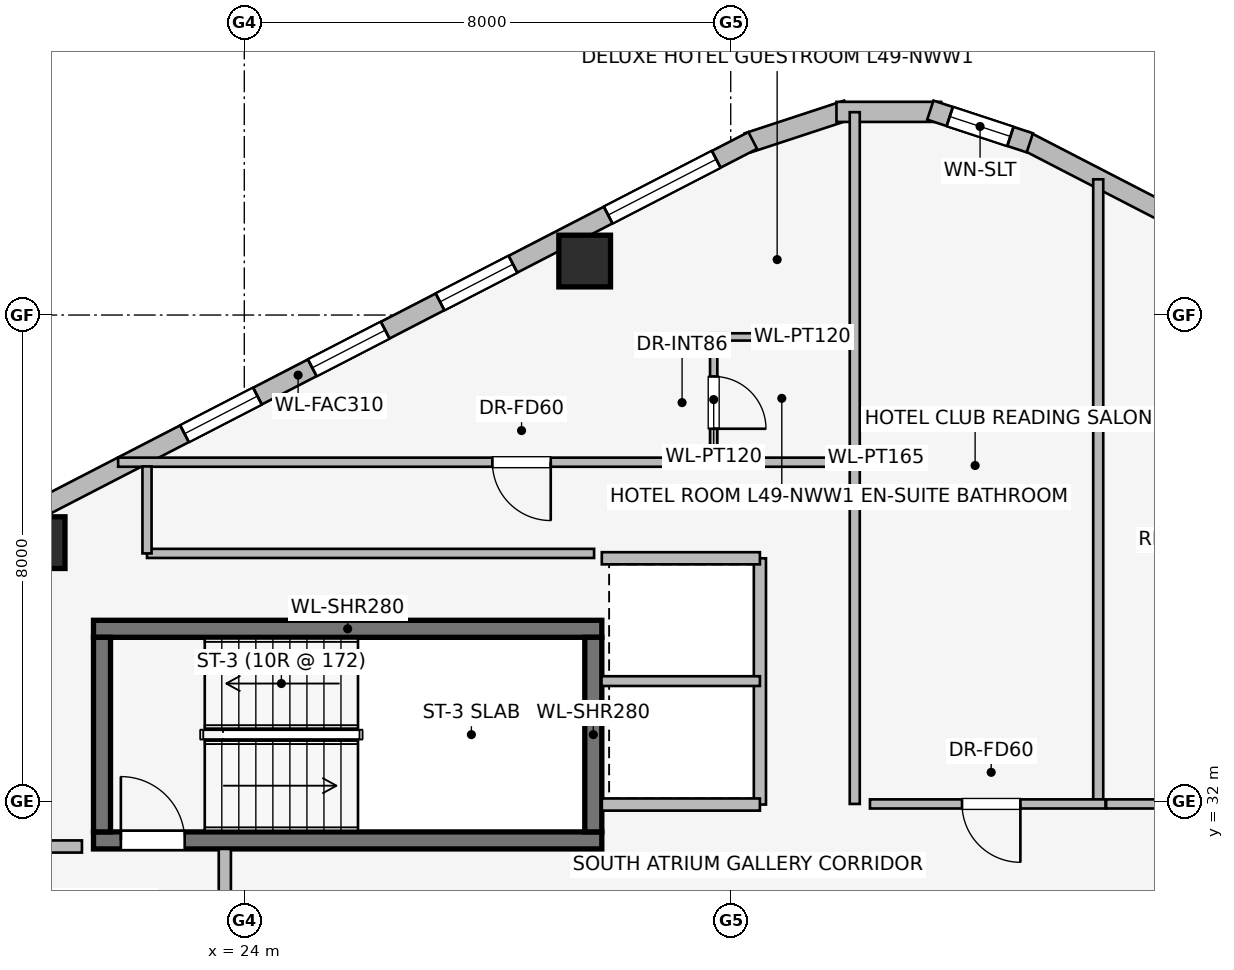
"""IFC4 building model, lengths in metres.
Left out: names, types, materials, properties, quantities, classifications, styles, units other than length and angle.
Written with IfcOpenShell. Run it as: python <this file> out.ifc"""

import sys

from ifc_helpers import new_model, si_unit, direction, frame, frame_2d, origin, origin_2d, place, context, subcontext, project, spatial, rectangle, extrude, element, fill, save


model = new_model("IFC4")
c1 = context("Model", 3, precision=1e-05, world=origin(), true_north=direction((0.0, 1.0)))
c2 = subcontext(c1, "Body", "Model", "MODEL_VIEW")
j1 = project(units=[si_unit("LENGTHUNIT", "METRE"), si_unit("PLANEANGLEUNIT", "RADIAN")], contexts=[c1])
p1 = place(None, origin())
s1 = spatial("IfcSite", under=j1, at=p1, CompositionType="ELEMENT")
p2 = place(p1, origin())
s2 = spatial("IfcBuilding", under=s1, at=p2, CompositionType="ELEMENT")
p3 = place(p2, frame((0.0, 0.0, 180.9)))
s3 = spatial("IfcBuildingStorey", under=s2, at=p3, CompositionType="ELEMENT", Elevation=180.9)
p4 = place(p3, frame((21.52, 31.36, 0.0), z_axis=(0.0, 0.0, 1.0), x_axis=(1.0, 0.0, 0.0)))
e1 = element("IfcWall", 1, at=p4, inside=s3, PredefinedType="SHEAR", context=c2, shape_type="SweptSolid", body=[
    extrude(rectangle(XDim=8.36, YDim=0.28, at=frame_2d((4.18, 0.0))), origin(), (0.0, 0.0, 1.0), 3.45),
])
p5 = place(p4, frame((0.45, 0.0, 0.0)))
e2 = element("IfcOpeningElement", 2, at=p5, cuts=e1, PredefinedType="OPENING", context=c2, shape_type="SweptSolid", body=[
    extrude(rectangle(XDim=1.05, YDim=2.0, at=frame_2d((0.525, 1.0))), frame((0.0, 0.15, 0.0), z_axis=(0.0, -1.0, 0.0), x_axis=(1.0, 0.0, 0.0)), (0.0, 0.0, 1.0), 0.3),
])
p6 = place(p3, frame((29.88, 34.84, 0.0), z_axis=(0.0, 0.0, 1.0), x_axis=(-1.0, 0.0, 0.0)))
e3 = element("IfcWall", 3, at=p6, inside=s3, PredefinedType="SHEAR", context=c2, shape_type="SweptSolid", body=[
    extrude(rectangle(XDim=8.36, YDim=0.28, at=frame_2d((4.18, 0.0))), origin(), (0.0, 0.0, 1.0), 3.45),
])
for number, where, z_axis, x_axis in (
    (4, (21.66, 34.7, 0.0), (0.0, 0.0, 1.0), (0.0, -1.0, 0.0)),
    (5, (29.74, 31.5, 0.0), (0.0, 0.0, 1.0), (0.0, 1.0, 0.0)),
):
    element("IfcWall", number, at=place(p3, frame(where, z_axis=z_axis, x_axis=x_axis)), inside=s3, PredefinedType="SHEAR", context=c2, shape_type="SweptSolid", body=[
        extrude(rectangle(XDim=3.2, YDim=0.28, at=frame_2d((1.6, 0.0))), origin(), (0.0, 0.0, 1.0), 3.45),
    ])
for number, where, z_axis, x_axis in (
    (6, (29.598, 40.888, 0.0), (0.0, 0.0, 1.0), (1.0, 0.0, 0.0)),
    (7, (20.626, 36.257, 0.0), (0.0, 0.0, 1.0), (1.0, 0.0, 0.0)),
):
    element("IfcColumn", number, at=place(p3, frame(where, z_axis=z_axis, x_axis=x_axis)), inside=s3, PredefinedType="COLUMN", context=c2, shape_type="SweptSolid", body=[
        extrude(rectangle(XDim=0.85, YDim=0.85, at=origin_2d()), origin(), (0.0, 0.0, 1.0), 3.45),
    ])
p7 = place(p3, frame((36.838, 42.871, 0.0), z_axis=(0.0, 0.0, 1.0), x_axis=(0.888626188278, -0.458632202867, 0.0)))
e8 = element("IfcWall", 8, at=p7, inside=s3, PredefinedType="STANDARD", context=c2, shape_type="SweptSolid", body=[
    extrude(rectangle(XDim=16.828, YDim=0.31, at=frame_2d((8.414, 0.0))), origin(), (0.0, 0.0, 1.0), 3.19),
])
p8 = place(p7, frame((4.172, 0.0, 0.75)))
e9 = element("IfcOpeningElement", 9, at=p8, cuts=e8, PredefinedType="OPENING", context=c2, shape_type="SweptSolid", body=[
    extrude(rectangle(XDim=1.05, YDim=1.4, at=frame_2d((0.525, 0.7))), frame((0.0, 0.165, 0.0), z_axis=(0.0, -1.0, 0.0), x_axis=(1.0, 0.0, 0.0)), (0.0, 0.0, 1.0), 0.33),
])
p9 = place(p7, frame((6.508, 0.0, 0.75)))
e10 = element("IfcOpeningElement", 10, at=p9, cuts=e8, PredefinedType="OPENING", context=c2, shape_type="SweptSolid", body=[
    extrude(rectangle(XDim=1.35, YDim=1.45, at=frame_2d((0.675, 0.725))), frame((0.0, 0.165, 0.0), z_axis=(0.0, -1.0, 0.0), x_axis=(1.0, 0.0, 0.0)), (0.0, 0.0, 1.0), 0.33),
])
p10 = place(p7, frame((8.497, 0.0, 0.75)))
e11 = element("IfcOpeningElement", 11, at=p10, cuts=e8, PredefinedType="OPENING", context=c2, shape_type="SweptSolid", body=[
    extrude(rectangle(XDim=1.35, YDim=1.45, at=frame_2d((0.675, 0.725))), frame((0.0, 0.165, 0.0), z_axis=(0.0, -1.0, 0.0), x_axis=(1.0, 0.0, 0.0)), (0.0, 0.0, 1.0), 0.33),
])
p11 = place(p7, frame((10.486, 0.0, 0.75)))
e12 = element("IfcOpeningElement", 12, at=p11, cuts=e8, PredefinedType="OPENING", context=c2, shape_type="SweptSolid", body=[
    extrude(rectangle(XDim=1.35, YDim=1.45, at=frame_2d((0.675, 0.725))), frame((0.0, 0.165, 0.0), z_axis=(0.0, -1.0, 0.0), x_axis=(1.0, 0.0, 0.0)), (0.0, 0.0, 1.0), 0.33),
])
p12 = place(p7, frame((14.153, 0.0, 0.75)))
e13 = element("IfcOpeningElement", 13, at=p12, cuts=e8, PredefinedType="OPENING", context=c2, shape_type="SweptSolid", body=[
    extrude(rectangle(XDim=2.0, YDim=1.5, at=frame_2d((1.0, 0.75))), frame((0.0, 0.165, 0.0), z_axis=(0.0, -1.0, 0.0), x_axis=(1.0, 0.0, 0.0)), (0.0, 0.0, 1.0), 0.33),
])
p13 = place(p3, frame((32.281, 42.832, 0.0), z_axis=(0.0, 0.0, 1.0), x_axis=(0.949937416267, 0.312440242569, 0.0)))
e14 = element("IfcWall", 14, at=p13, inside=s3, PredefinedType="STANDARD", context=c2, shape_type="SweptSolid", body=[
    extrude(rectangle(XDim=1.722, YDim=0.33, at=frame_2d((0.861, 0.0))), origin(), (0.0, 0.0, 1.0), 3.19),
])
p14 = place(p3, frame((33.739, 43.341, 0.0), z_axis=(0.0, 0.0, 1.0), x_axis=(1.0, 0.0, 0.0)))
e15 = element("IfcWall", 15, at=p14, inside=s3, PredefinedType="STANDARD", context=c2, shape_type="SweptSolid", body=[
    extrude(rectangle(XDim=1.722, YDim=0.33, at=frame_2d((0.861, 0.0))), origin(), (0.0, 0.0, 1.0), 3.19),
])
p15 = place(p3, frame((35.283, 43.37, 0.0), z_axis=(0.0, 0.0, 1.0), x_axis=(0.949937416267, -0.312440242569, 0.0)))
e16 = element("IfcWall", 16, at=p15, inside=s3, PredefinedType="STANDARD", context=c2, shape_type="SweptSolid", body=[
    extrude(rectangle(XDim=1.722, YDim=0.33, at=frame_2d((0.861, 0.0))), origin(), (0.0, 0.0, 1.0), 3.19),
])
p16 = place(p15, frame((0.336, 0.0, 0.75)))
e17 = element("IfcOpeningElement", 17, at=p16, cuts=e16, PredefinedType="OPENING", context=c2, shape_type="SweptSolid", body=[
    extrude(rectangle(XDim=1.05, YDim=1.4, at=frame_2d((0.525, 0.7))), frame((0.0, 0.175, 0.0), z_axis=(0.0, -1.0, 0.0), x_axis=(1.0, 0.0, 0.0)), (0.0, 0.0, 1.0), 0.35),
])
p17 = place(p3, frame((17.408, 35.153, 0.0), z_axis=(0.0, 0.0, 1.0), x_axis=(0.888626188278, 0.458632202867, 0.0)))
e18 = element("IfcWall", 18, at=p17, inside=s3, PredefinedType="STANDARD", context=c2, shape_type="SweptSolid", body=[
    extrude(rectangle(XDim=16.828, YDim=0.31, at=frame_2d((8.414, 0.0))), origin(), (0.0, 0.0, 1.0), 3.19),
])
p18 = place(p17, frame((0.675, 0.0, 0.75)))
e19 = element("IfcOpeningElement", 19, at=p18, cuts=e18, PredefinedType="OPENING", context=c2, shape_type="SweptSolid", body=[
    extrude(rectangle(XDim=2.0, YDim=1.5, at=frame_2d((1.0, 0.75))), frame((0.0, 0.165, 0.0), z_axis=(0.0, -1.0, 0.0), x_axis=(1.0, 0.0, 0.0)), (0.0, 0.0, 1.0), 0.33),
])
p19 = place(p17, frame((6.312, 0.0, 0.75)))
e20 = element("IfcOpeningElement", 20, at=p19, cuts=e18, PredefinedType="OPENING", context=c2, shape_type="SweptSolid", body=[
    extrude(rectangle(XDim=1.35, YDim=1.45, at=frame_2d((0.675, 0.725))), frame((0.0, 0.165, 0.0), z_axis=(0.0, -1.0, 0.0), x_axis=(1.0, 0.0, 0.0)), (0.0, 0.0, 1.0), 0.33),
])
p20 = place(p17, frame((8.676, 0.0, 0.75)))
e21 = element("IfcOpeningElement", 21, at=p20, cuts=e18, PredefinedType="OPENING", context=c2, shape_type="SweptSolid", body=[
    extrude(rectangle(XDim=1.35, YDim=1.45, at=frame_2d((0.675, 0.725))), frame((0.0, 0.165, 0.0), z_axis=(0.0, -1.0, 0.0), x_axis=(1.0, 0.0, 0.0)), (0.0, 0.0, 1.0), 0.33),
])
p21 = place(p17, frame((11.041, 0.0, 0.75)))
e22 = element("IfcOpeningElement", 22, at=p21, cuts=e18, PredefinedType="OPENING", context=c2, shape_type="SweptSolid", body=[
    extrude(rectangle(XDim=1.35, YDim=1.45, at=frame_2d((0.675, 0.725))), frame((0.0, 0.165, 0.0), z_axis=(0.0, -1.0, 0.0), x_axis=(1.0, 0.0, 0.0)), (0.0, 0.0, 1.0), 0.33),
])
p22 = place(p17, frame((14.153, 0.0, 0.75)))
e23 = element("IfcOpeningElement", 23, at=p22, cuts=e18, PredefinedType="OPENING", context=c2, shape_type="SweptSolid", body=[
    extrude(rectangle(XDim=2.0, YDim=1.5, at=frame_2d((1.0, 0.75))), frame((0.0, 0.165, 0.0), z_axis=(0.0, -1.0, 0.0), x_axis=(1.0, 0.0, 0.0)), (0.0, 0.0, 1.0), 0.33),
])
p23 = place(p3, frame((23.68, 25.68, 0.0), z_axis=(0.0, 0.0, 1.0), x_axis=(0.0, 1.0, 0.0)))
e24 = element("IfcWall", 24, at=p23, inside=s3, PredefinedType="PARTITIONING", context=c2, shape_type="SweptSolid", body=[
    extrude(rectangle(XDim=5.54, YDim=0.2, at=frame_2d((2.77, 0.0))), origin(), (0.0, 0.0, 1.0), 3.19),
])
p24 = place(p23, frame((1.8, 0.0, 0.0)))
e25 = element("IfcOpeningElement", 25, at=p24, cuts=e24, PredefinedType="OPENING", context=c2, shape_type="SweptSolid", body=[
    extrude(rectangle(XDim=1.05, YDim=2.0, at=frame_2d((0.525, 1.0))), frame((0.0, 0.11, 0.0), z_axis=(0.0, -1.0, 0.0), x_axis=(1.0, 0.0, 0.0)), (0.0, 0.0, 1.0), 0.22),
])
p25 = place(p3, frame((21.33, 31.26, 0.0), z_axis=(0.0, 0.0, 1.0), x_axis=(-1.0, 0.0, 0.0)))
e26 = element("IfcWall", 26, at=p25, inside=s3, PredefinedType="PARTITIONING", context=c2, shape_type="SweptSolid", body=[
    extrude(rectangle(XDim=1.68, YDim=0.2, at=frame_2d((0.84, 0.0))), origin(), (0.0, 0.0, 1.0), 3.19),
])
p26 = place(p3, frame((32.48, 31.95, 0.0), z_axis=(0.0, 0.0, 1.0), x_axis=(0.0, 1.0, 0.0)))
e27 = element("IfcWall", 27, at=p26, inside=s3, PredefinedType="PARTITIONING", context=c2, shape_type="SweptSolid", body=[
    extrude(rectangle(XDim=4.05, YDim=0.2, at=frame_2d((2.025, 0.0))), origin(), (0.0, 0.0, 1.0), 3.19),
])
for number, where, z_axis, x_axis in (
    (28, (29.88, 36.0, 0.0), (0.0, 0.0, 1.0), (1.0, 0.0, 0.0)),
    (29, (32.48, 31.95, 0.0), (0.0, 0.0, 1.0), (-1.0, 0.0, 0.0)),
):
    element("IfcWall", number, at=place(p3, frame(where, z_axis=z_axis, x_axis=x_axis)), inside=s3, PredefinedType="PARTITIONING", context=c2, shape_type="SweptSolid", body=[
        extrude(rectangle(XDim=2.6, YDim=0.2, at=frame_2d((1.3, 0.0))), origin(), (0.0, 0.0, 1.0), 3.19),
    ])
p27 = place(p3, frame((29.875, 33.98, 0.0), z_axis=(0.0, 0.0, 1.0), x_axis=(1.0, 0.0, 0.0)))
e30 = element("IfcWall", 30, at=p27, inside=s3, PredefinedType="PARTITIONING", context=c2, shape_type="SweptSolid", body=[
    extrude(rectangle(XDim=2.605, YDim=0.16, at=frame_2d((1.302, 0.0))), origin(), (0.0, 0.0, 1.0), 3.19),
])
p28 = place(p3, frame((34.0, 39.64, 0.0), z_axis=(0.0, 0.0, 1.0), x_axis=(-1.0, 0.0, 0.0)))
e31 = element("IfcWall", 31, at=p28, inside=s3, PredefinedType="PARTITIONING", context=c2, shape_type="SweptSolid", body=[
    extrude(rectangle(XDim=2.34, YDim=0.12, at=frame_2d((1.17, 0.0))), origin(), (0.0, 0.0, 1.0), 3.19),
])
p29 = place(p3, frame((31.72, 39.64, 0.0), z_axis=(0.0, 0.0, 1.0), x_axis=(0.0, -1.0, 0.0)))
e32 = element("IfcWall", 32, at=p29, inside=s3, PredefinedType="PARTITIONING", context=c2, shape_type="SweptSolid", body=[
    extrude(rectangle(XDim=2.06, YDim=0.12, at=frame_2d((1.03, 0.0))), origin(), (0.0, 0.0, 1.0), 3.19),
])
p30 = place(p29, frame((0.65, 0.0, 0.0)))
e33 = element("IfcOpeningElement", 33, at=p30, cuts=e32, PredefinedType="OPENING", context=c2, shape_type="SweptSolid", body=[
    extrude(rectangle(XDim=0.86, YDim=2.0, at=frame_2d((0.43, 1.0))), frame((0.0, 0.07, 0.0), z_axis=(0.0, -1.0, 0.0), x_axis=(1.0, 0.0, 0.0)), (0.0, 0.0, 1.0), 0.14),
])
p31 = place(p3, frame((34.0, 37.58, 0.0), z_axis=(0.0, 0.0, 1.0), x_axis=(-1.0, 0.0, 0.0)))
e34 = element("IfcWall", 34, at=p31, inside=s3, PredefinedType="PARTITIONING", context=c2, shape_type="SweptSolid", body=[
    extrude(rectangle(XDim=12.075, YDim=0.15, at=frame_2d((6.038, 0.0))), origin(), (0.0, 0.0, 1.0), 3.19),
])
p32 = place(p31, frame((4.96, 0.0, 0.0)))
e35 = element("IfcOpeningElement", 35, at=p32, cuts=e34, PredefinedType="OPENING", context=c2, shape_type="SweptSolid", body=[
    extrude(rectangle(XDim=0.96, YDim=2.0, at=frame_2d((0.48, 1.0))), frame((0.0, 0.085, 0.0), z_axis=(0.0, -1.0, 0.0), x_axis=(1.0, 0.0, 0.0)), (0.0, 0.0, 1.0), 0.17),
])
p33 = place(p3, frame((34.04, 31.96, 0.0), z_axis=(0.0, 0.0, 1.0), x_axis=(0.0, 1.0, 0.0)))
e36 = element("IfcWall", 36, at=p33, inside=s3, PredefinedType="PARTITIONING", context=c2, shape_type="SweptSolid", body=[
    extrude(rectangle(XDim=11.376, YDim=0.165, at=frame_2d((5.688, 0.0))), origin(), (0.0, 0.0, 1.0), 3.19),
])
p34 = place(p3, frame((38.044, 31.97, 0.0), z_axis=(0.0, 0.0, 1.0), x_axis=(0.0, 1.0, 0.0)))
e37 = element("IfcWall", 37, at=p34, inside=s3, PredefinedType="PARTITIONING", context=c2, shape_type="SweptSolid", body=[
    extrude(rectangle(XDim=10.262, YDim=0.165, at=frame_2d((5.131, 0.0))), origin(), (0.0, 0.0, 1.0), 3.19),
])
p35 = place(p3, frame((38.164, 31.96, 0.0), z_axis=(0.0, 0.0, 1.0), x_axis=(-1.0, 0.0, 0.0)))
e38 = element("IfcWall", 38, at=p35, inside=s3, PredefinedType="PARTITIONING", context=c2, shape_type="SweptSolid", body=[
    extrude(rectangle(XDim=3.874, YDim=0.15, at=frame_2d((1.937, 0.0))), origin(), (0.0, 0.0, 1.0), 3.19),
])
p36 = place(p35, frame((1.4, 0.0, 0.0)))
e39 = element("IfcOpeningElement", 39, at=p36, cuts=e38, PredefinedType="OPENING", context=c2, shape_type="SweptSolid", body=[
    extrude(rectangle(XDim=0.96, YDim=2.0, at=frame_2d((0.48, 1.0))), frame((0.0, 0.085, 0.0), z_axis=(0.0, -1.0, 0.0), x_axis=(1.0, 0.0, 0.0)), (0.0, 0.0, 1.0), 0.17),
])
p37 = place(p3, frame((41.992, 31.96, 0.0), z_axis=(0.0, 0.0, 1.0), x_axis=(-1.0, 0.0, 0.0)))
e40 = element("IfcWall", 40, at=p37, inside=s3, PredefinedType="PARTITIONING", context=c2, shape_type="SweptSolid", body=[
    extrude(rectangle(XDim=3.818, YDim=0.15, at=frame_2d((1.909, 0.0))), origin(), (0.0, 0.0, 1.0), 3.19),
])
p38 = place(p37, frame((1.486, 0.0, 0.0)))
e41 = element("IfcOpeningElement", 41, at=p38, cuts=e40, PredefinedType="OPENING", context=c2, shape_type="SweptSolid", body=[
    extrude(rectangle(XDim=0.96, YDim=2.0, at=frame_2d((0.48, 1.0))), frame((0.0, 0.085, 0.0), z_axis=(0.0, -1.0, 0.0), x_axis=(1.0, 0.0, 0.0)), (0.0, 0.0, 1.0), 0.17),
])
p39 = place(p3, frame((29.753, 36.08, 0.0), z_axis=(0.0, 0.0, 1.0), x_axis=(-1.0, 0.0, 0.0)))
e42 = element("IfcWall", 42, at=p39, inside=s3, PredefinedType="PARTITIONING", context=c2, shape_type="SweptSolid", body=[
    extrude(rectangle(XDim=7.353, YDim=0.15, at=frame_2d((3.677, 0.0))), origin(), (0.0, 0.0, 1.0), 3.19),
])
p40 = place(p3, frame((22.4, 36.08, 0.0), z_axis=(0.0, 0.0, 1.0), x_axis=(0.0, 1.0, 0.0)))
e43 = element("IfcWall", 43, at=p40, inside=s3, PredefinedType="PARTITIONING", context=c2, shape_type="SweptSolid", body=[
    extrude(rectangle(XDim=1.43, YDim=0.15, at=frame_2d((0.715, 0.0))), origin(), (0.0, 0.0, 1.0), 3.19),
])
p41 = place(p16, origin())
e44 = element("IfcWindow", 44, at=p41, inside=s3, PartitioningType="SINGLE_PANEL", PredefinedType="WINDOW", context=c2, shape_type="SweptSolid", body=[
    extrude(rectangle(XDim=1.05, YDim=1.4, at=frame_2d((0.525, 0.7))), frame((0.0, 0.03, 0.0), z_axis=(0.0, -1.0, 0.0), x_axis=(1.0, 0.0, 0.0)), (0.0, 0.0, 1.0), 0.06),
])
fill(e17, e44)
p42 = place(p19, origin())
e45 = element("IfcWindow", 45, at=p42, inside=s3, PartitioningType="SINGLE_PANEL", PredefinedType="WINDOW", context=c2, shape_type="SweptSolid", body=[
    extrude(rectangle(XDim=1.35, YDim=1.45, at=frame_2d((0.675, 0.725))), frame((0.0, 0.03, 0.0), z_axis=(0.0, -1.0, 0.0), x_axis=(1.0, 0.0, 0.0)), (0.0, 0.0, 1.0), 0.06),
])
fill(e20, e45)
p43 = place(p20, origin())
e46 = element("IfcWindow", 46, at=p43, inside=s3, PartitioningType="SINGLE_PANEL", PredefinedType="WINDOW", context=c2, shape_type="SweptSolid", body=[
    extrude(rectangle(XDim=1.35, YDim=1.45, at=frame_2d((0.675, 0.725))), frame((0.0, 0.03, 0.0), z_axis=(0.0, -1.0, 0.0), x_axis=(1.0, 0.0, 0.0)), (0.0, 0.0, 1.0), 0.06),
])
fill(e21, e46)
p44 = place(p21, origin())
e47 = element("IfcWindow", 47, at=p44, inside=s3, PartitioningType="SINGLE_PANEL", PredefinedType="WINDOW", context=c2, shape_type="SweptSolid", body=[
    extrude(rectangle(XDim=1.35, YDim=1.45, at=frame_2d((0.675, 0.725))), frame((0.0, 0.03, 0.0), z_axis=(0.0, -1.0, 0.0), x_axis=(1.0, 0.0, 0.0)), (0.0, 0.0, 1.0), 0.06),
])
fill(e22, e47)
p45 = place(p22, origin())
e48 = element("IfcWindow", 48, at=p45, inside=s3, PartitioningType="SINGLE_PANEL", PredefinedType="WINDOW", context=c2, shape_type="SweptSolid", body=[
    extrude(rectangle(XDim=2.0, YDim=1.5, at=frame_2d((1.0, 0.75))), frame((0.0, 0.03, 0.0), z_axis=(0.0, -1.0, 0.0), x_axis=(1.0, 0.0, 0.0)), (0.0, 0.0, 1.0), 0.06),
])
fill(e23, e48)
p46 = place(p5, origin())
e49 = element("IfcDoor", 49, at=p46, inside=s3, OperationType="SINGLE_SWING_LEFT", PredefinedType="DOOR", context=c2, shape_type="SweptSolid", body=[
    extrude(rectangle(XDim=1.05, YDim=2.0, at=frame_2d((0.525, 1.0))), frame((0.0, 0.025, 0.0), z_axis=(0.0, -1.0, 0.0), x_axis=(1.0, 0.0, 0.0)), (0.0, 0.0, 1.0), 0.05),
])
fill(e2, e49)
p47 = place(p30, origin())
e50 = element("IfcDoor", 50, at=p47, inside=s3, OperationType="SINGLE_SWING_RIGHT", PredefinedType="DOOR", context=c2, shape_type="SweptSolid", body=[
    extrude(rectangle(XDim=0.86, YDim=2.0, at=frame_2d((0.43, 1.0))), frame((0.0, 0.025, 0.0), z_axis=(0.0, -1.0, 0.0), x_axis=(1.0, 0.0, 0.0)), (0.0, 0.0, 1.0), 0.05),
])
fill(e33, e50)
p48 = place(p32, origin())
e51 = element("IfcDoor", 51, at=p48, inside=s3, OperationType="SINGLE_SWING_LEFT", PredefinedType="DOOR", context=c2, shape_type="SweptSolid", body=[
    extrude(rectangle(XDim=0.96, YDim=2.0, at=frame_2d((0.48, 1.0))), frame((0.0, 0.025, 0.0), z_axis=(0.0, -1.0, 0.0), x_axis=(1.0, 0.0, 0.0)), (0.0, 0.0, 1.0), 0.05),
])
fill(e35, e51)
p49 = place(p36, origin())
e52 = element("IfcDoor", 52, at=p49, inside=s3, OperationType="SINGLE_SWING_LEFT", PredefinedType="DOOR", context=c2, shape_type="SweptSolid", body=[
    extrude(rectangle(XDim=0.96, YDim=2.0, at=frame_2d((0.48, 1.0))), frame((0.0, 0.025, 0.0), z_axis=(0.0, -1.0, 0.0), x_axis=(1.0, 0.0, 0.0)), (0.0, 0.0, 1.0), 0.05),
])
fill(e39, e52)
save(model, sys.argv[1])
